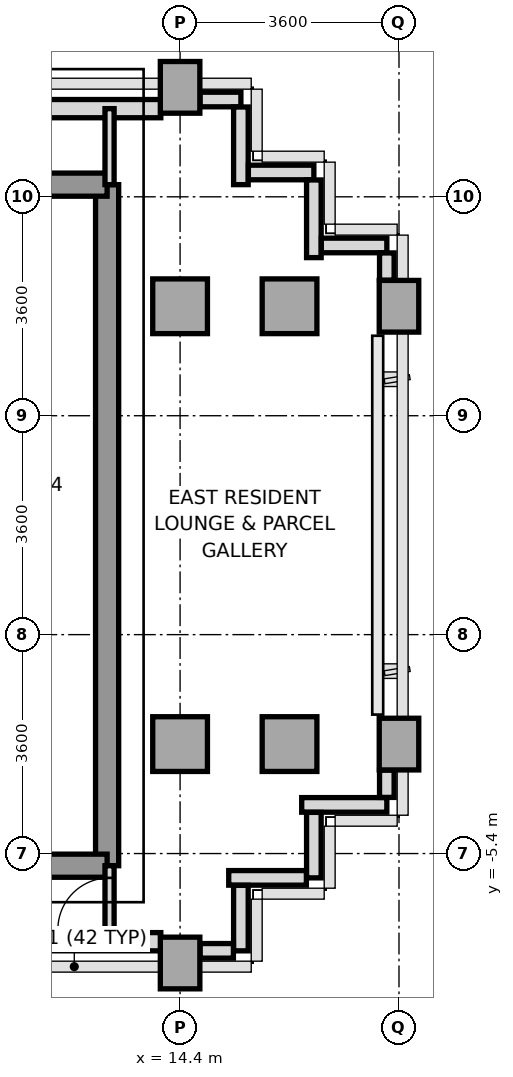
"""IFC4 building model, lengths in metres.
Left out: names, types, materials, properties, quantities, classifications, styles, units other than length and angle.
Written with IfcOpenShell. Run it as: python <this file> out.ifc"""

import sys

from ifc_helpers import new_model, si_unit, direction, frame, frame_2d, origin, origin_2d, place, context, subcontext, project, spatial, rectangle, extrude, source, transform, mapped, element, fill, save


model = new_model("IFC4")
c1 = context("Model", 3, precision=1e-05, world=origin(), true_north=direction((0.0, 1.0)))
c2 = subcontext(c1, "Body", "Model", "MODEL_VIEW")
j1 = project(units=[si_unit("LENGTHUNIT", "METRE"), si_unit("PLANEANGLEUNIT", "RADIAN")], contexts=[c1])
p1 = place(None, origin())
s1 = spatial("IfcSite", under=j1, at=p1, CompositionType="ELEMENT")
p2 = place(p1, origin())
s2 = spatial("IfcBuilding", under=s1, at=p2, CompositionType="ELEMENT")
p3 = place(p2, frame((0.0, 0.0, 211.4)))
s3 = spatial("IfcBuildingStorey", under=s2, at=p3, CompositionType="ELEMENT", Elevation=211.4)
m1 = source(origin(), c2, "Body", "SweptSolid", [
    extrude(rectangle(XDim=0.65, YDim=0.85, at=origin_2d()), origin(), (0.0, 0.0, 1.0), 3.14),
])
p4 = place(p3, frame((14.4, -7.2, 0.0), z_axis=(0.0, 0.0, 1.0), x_axis=(1.0, 0.0, 0.0)))
e1 = element("IfcColumn", 1, at=p4, inside=s3, PredefinedType="COLUMN", context=c2, shape_type="MappedRepresentation", body=[
    mapped(m1, transform((0.0, 0.0, 0.0), x_axis=(1.0, 0.0, 0.0), y_axis=(0.0, 1.0, 0.0), z_axis=(0.0, 0.0, 1.0), scale=1.0)),
])
m2 = source(origin(), c2, "Body", "SweptSolid", [
    extrude(rectangle(XDim=0.9, YDim=0.9, at=origin_2d()), origin(), (0.0, 0.0, 1.0), 3.14),
])
for number, where, z_axis, x_axis in (
    (2, (14.4, -3.6, 0.0), (0.0, 0.0, 1.0), (1.0, 0.0, 0.0)),
    (3, (14.4, 3.6, 0.0), (0.0, 0.0, 1.0), (1.0, 0.0, 0.0)),
):
    element("IfcColumn", number, at=place(p3, frame(where, z_axis=z_axis, x_axis=x_axis)), inside=s3, PredefinedType="COLUMN", context=c2, shape_type="MappedRepresentation", body=[
        mapped(m2, transform((0.0, 0.0, 0.0), x_axis=(1.0, 0.0, 0.0), y_axis=(0.0, 1.0, 0.0), z_axis=(0.0, 0.0, 1.0), scale=1.0)),
    ])
p5 = place(p3, frame((14.4, 7.2, 0.0), z_axis=(0.0, 0.0, 1.0), x_axis=(1.0, 0.0, 0.0)))
e4 = element("IfcColumn", 4, at=p5, inside=s3, PredefinedType="COLUMN", context=c2, shape_type="MappedRepresentation", body=[
    mapped(m1, transform((0.0, 0.0, 0.0), x_axis=(1.0, 0.0, 0.0), y_axis=(0.0, 1.0, 0.0), z_axis=(0.0, 0.0, 1.0), scale=1.0)),
])
for number, where, z_axis, x_axis in (
    (5, (16.2, -3.6, 0.0), (0.0, 0.0, 1.0), (1.0, 0.0, 0.0)),
    (6, (16.2, 3.6, 0.0), (0.0, 0.0, 1.0), (1.0, 0.0, 0.0)),
):
    element("IfcColumn", number, at=place(p3, frame(where, z_axis=z_axis, x_axis=x_axis)), inside=s3, PredefinedType="COLUMN", context=c2, shape_type="MappedRepresentation", body=[
        mapped(m2, transform((0.0, 0.0, 0.0), x_axis=(1.0, 0.0, 0.0), y_axis=(0.0, 1.0, 0.0), z_axis=(0.0, 0.0, 1.0), scale=1.0)),
    ])
for number, where, z_axis, x_axis in (
    (7, (18.0, -3.6, 0.0), (0.0, 0.0, 1.0), (1.0, 0.0, 0.0)),
    (8, (18.0, 3.6, 0.0), (0.0, 0.0, 1.0), (1.0, 0.0, 0.0)),
):
    element("IfcColumn", number, at=place(p3, frame(where, z_axis=z_axis, x_axis=x_axis)), inside=s3, PredefinedType="COLUMN", context=c2, shape_type="MappedRepresentation", body=[
        mapped(m1, transform((0.0, 0.0, 0.0), x_axis=(1.0, 0.0, 0.0), y_axis=(0.0, 1.0, 0.0), z_axis=(0.0, 0.0, 1.0), scale=1.0)),
    ])
p6 = place(p3, frame((11.448, 6.85, 0.0), z_axis=(0.0, 0.0, 1.0), x_axis=(1.0, 0.0, 0.0)))
e9 = element("IfcWall", 9, at=p6, inside=s3, PredefinedType="SOLIDWALL", context=c2, shape_type="SweptSolid", body=[
    extrude(rectangle(XDim=2.635, YDim=0.3, at=frame_2d((1.317, 0.0))), origin(), (0.0, 0.0, 1.0), 3.14),
])
p7 = place(p3, frame((11.75, -6.85, 0.0), z_axis=(0.0, 0.0, 1.0), x_axis=(1.0, 0.0, 0.0)))
e10 = element("IfcWall", 10, at=p7, inside=s3, PredefinedType="SOLIDWALL", context=c2, shape_type="SweptSolid", body=[
    extrude(rectangle(XDim=2.333, YDim=0.3, at=frame_2d((1.167, 0.0))), origin(), (0.0, 0.0, 1.0), 3.14),
])
p8 = place(p3, frame((17.8, -4.6, 0.0), z_axis=(0.0, 0.0, 1.0), x_axis=(-1.0, 0.0, 0.0)))
e11 = element("IfcWall", 11, at=p8, inside=s3, PredefinedType="PARAPET", context=c2, shape_type="SweptSolid", body=[
    extrude(rectangle(XDim=1.4, YDim=0.24, at=frame_2d((0.7, 0.0))), origin(), (0.0, 0.0, 1.0), 1.15),
])
p9 = place(p3, frame((16.6, -4.723, 0.0), z_axis=(0.0, 0.0, 1.0), x_axis=(0.0, -1.0, 0.0)))
e12 = element("IfcWall", 12, at=p9, inside=s3, PredefinedType="PARAPET", context=c2, shape_type="SweptSolid", body=[
    extrude(rectangle(XDim=1.077, YDim=0.24, at=frame_2d((0.539, 0.0))), origin(), (0.0, 0.0, 1.0), 1.15),
])
p10 = place(p3, frame((16.477, -5.8, 0.0), z_axis=(0.0, 0.0, 1.0), x_axis=(-1.0, 0.0, 0.0)))
e13 = element("IfcWall", 13, at=p10, inside=s3, PredefinedType="PARAPET", context=c2, shape_type="SweptSolid", body=[
    extrude(rectangle(XDim=1.277, YDim=0.24, at=frame_2d((0.639, 0.0))), origin(), (0.0, 0.0, 1.0), 1.15),
])
p11 = place(p3, frame((15.4, -5.923, 0.0), z_axis=(0.0, 0.0, 1.0), x_axis=(0.0, -1.0, 0.0)))
e14 = element("IfcWall", 14, at=p11, inside=s3, PredefinedType="PARAPET", context=c2, shape_type="SweptSolid", body=[
    extrude(rectangle(XDim=1.077, YDim=0.24, at=frame_2d((0.539, 0.0))), origin(), (0.0, 0.0, 1.0), 1.15),
])
p12 = place(p3, frame((15.277, -7.0, 0.0), z_axis=(0.0, 0.0, 1.0), x_axis=(-1.0, 0.0, 0.0)))
e15 = element("IfcWall", 15, at=p12, inside=s3, PredefinedType="PARAPET", context=c2, shape_type="SweptSolid", body=[
    extrude(rectangle(XDim=0.549, YDim=0.24, at=frame_2d((0.274, 0.0))), origin(), (0.0, 0.0, 1.0), 1.15),
])
p13 = place(p3, frame((14.728, 7.0, 0.0), z_axis=(0.0, 0.0, 1.0), x_axis=(1.0, 0.0, 0.0)))
e16 = element("IfcWall", 16, at=p13, inside=s3, PredefinedType="PARAPET", context=c2, shape_type="SweptSolid", body=[
    extrude(rectangle(XDim=0.672, YDim=0.24, at=frame_2d((0.336, 0.0))), origin(), (0.0, 0.0, 1.0), 1.15),
])
p14 = place(p3, frame((15.4, 6.877, 0.0), z_axis=(0.0, 0.0, 1.0), x_axis=(0.0, -1.0, 0.0)))
e17 = element("IfcWall", 17, at=p14, inside=s3, PredefinedType="PARAPET", context=c2, shape_type="SweptSolid", body=[
    extrude(rectangle(XDim=1.277, YDim=0.24, at=frame_2d((0.638, 0.0))), origin(), (0.0, 0.0, 1.0), 1.15),
])
p15 = place(p3, frame((15.523, 5.8, 0.0), z_axis=(0.0, 0.0, 1.0), x_axis=(1.0, 0.0, 0.0)))
e18 = element("IfcWall", 18, at=p15, inside=s3, PredefinedType="PARAPET", context=c2, shape_type="SweptSolid", body=[
    extrude(rectangle(XDim=1.077, YDim=0.24, at=frame_2d((0.539, 0.0))), origin(), (0.0, 0.0, 1.0), 1.15),
])
p16 = place(p3, frame((16.6, 5.677, 0.0), z_axis=(0.0, 0.0, 1.0), x_axis=(0.0, -1.0, 0.0)))
e19 = element("IfcWall", 19, at=p16, inside=s3, PredefinedType="PARAPET", context=c2, shape_type="SweptSolid", body=[
    extrude(rectangle(XDim=1.277, YDim=0.24, at=frame_2d((0.639, 0.0))), origin(), (0.0, 0.0, 1.0), 1.15),
])
p17 = place(p3, frame((16.723, 4.6, 0.0), z_axis=(0.0, 0.0, 1.0), x_axis=(1.0, 0.0, 0.0)))
e20 = element("IfcWall", 20, at=p17, inside=s3, PredefinedType="PARAPET", context=c2, shape_type="SweptSolid", body=[
    extrude(rectangle(XDim=1.077, YDim=0.24, at=frame_2d((0.539, 0.0))), origin(), (0.0, 0.0, 1.0), 1.15),
])
for number, where, z_axis, x_axis in (
    (21, (17.8, 4.477, 0.0), (0.0, 0.0, 1.0), (0.0, -1.0, 0.0)),
    (22, (17.8, -4.028, 0.0), (0.0, 0.0, 1.0), (0.0, -1.0, 0.0)),
):
    element("IfcWall", number, at=place(p3, frame(where, z_axis=z_axis, x_axis=x_axis)), inside=s3, PredefinedType="PARAPET", context=c2, shape_type="SweptSolid", body=[
        extrude(rectangle(XDim=0.449, YDim=0.24, at=frame_2d((0.225, 0.0))), origin(), (0.0, 0.0, 1.0), 1.15),
    ])
p18 = place(p3, frame((13.2, -5.6, 0.0), z_axis=(0.0, 0.0, 1.0), x_axis=(0.0, 1.0, 0.0)))
e23 = element("IfcWall", 23, at=p18, inside=s3, PredefinedType="SHEAR", context=c2, shape_type="SweptSolid", body=[
    extrude(rectangle(XDim=11.2, YDim=0.38, at=frame_2d((5.6, 0.0))), origin(), (0.0, 0.0, 1.0), 3.14),
])
p19 = place(p3, frame((11.356, 5.6, 0.0), z_axis=(0.0, 0.0, 1.0), x_axis=(1.0, 0.0, 0.0)))
e24 = element("IfcWall", 24, at=p19, inside=s3, PredefinedType="SHEAR", context=c2, shape_type="SweptSolid", body=[
    extrude(rectangle(XDim=1.844, YDim=0.38, at=frame_2d((0.922, 0.0))), origin(), (0.0, 0.0, 1.0), 3.14),
])
p20 = place(p3, frame((5.4, -5.6, 0.0), z_axis=(0.0, 0.0, 1.0), x_axis=(1.0, 0.0, 0.0)))
e25 = element("IfcWall", 25, at=p20, inside=s3, PredefinedType="SHEAR", context=c2, shape_type="SweptSolid", body=[
    extrude(rectangle(XDim=7.8, YDim=0.38, at=frame_2d((3.9, 0.0))), origin(), (0.0, 0.0, 1.0), 3.14),
])
p21 = place(p3, frame((13.24, 5.6, 0.0), z_axis=(0.0, 0.0, 1.0), x_axis=(0.0, 1.0, 0.0)))
e26 = element("IfcWall", 26, at=p21, inside=s3, PredefinedType="PARTITIONING", context=c2, shape_type="SweptSolid", body=[
    extrude(rectangle(XDim=1.25, YDim=0.15, at=frame_2d((0.625, 0.0))), origin(), (0.0, 0.0, 1.0), 3.14),
])
p22 = place(p3, frame((13.24, -6.85, 0.0), z_axis=(0.0, 0.0, 1.0), x_axis=(0.0, 1.0, 0.0)))
e27 = element("IfcWall", 27, at=p22, inside=s3, PredefinedType="PARTITIONING", context=c2, shape_type="SweptSolid", body=[
    extrude(rectangle(XDim=1.25, YDim=0.15, at=frame_2d((0.625, 0.0))), origin(), (0.0, 0.0, 1.0), 3.14),
])
p23 = place(p22, frame((0.2, 0.0, 0.0)))
e28 = element("IfcOpeningElement", 28, at=p23, cuts=e27, PredefinedType="OPENING", context=c2, shape_type="SweptSolid", body=[
    extrude(rectangle(XDim=0.85, YDim=2.1, at=frame_2d((0.425, 1.05))), frame((0.0, 0.085, 0.0), z_axis=(0.0, -1.0, 0.0), x_axis=(1.0, 0.0, 0.0)), (0.0, 0.0, 1.0), 0.17),
])
m3 = source(origin(), c2, "Body", "SweptSolid", [
    extrude(rectangle(XDim=0.85, YDim=2.1, at=frame_2d((0.425, 1.05))), frame((0.0, 0.025, 0.0), z_axis=(0.0, -1.0, 0.0), x_axis=(1.0, 0.0, 0.0)), (0.0, 0.0, 1.0), 0.05),
])
p24 = place(p23, origin())
e29 = element("IfcDoor", 29, at=p24, inside=s3, OperationType="SINGLE_SWING_LEFT", PredefinedType="DOOR", context=c2, shape_type="MappedRepresentation", body=[
    mapped(m3, transform((0.0, 0.0, 0.0), x_axis=(1.0, 0.0, 0.0), y_axis=(0.0, 1.0, 0.0), z_axis=(0.0, 0.0, 1.0), scale=1.0)),
])
fill(e28, e29)
save(model, sys.argv[1])
